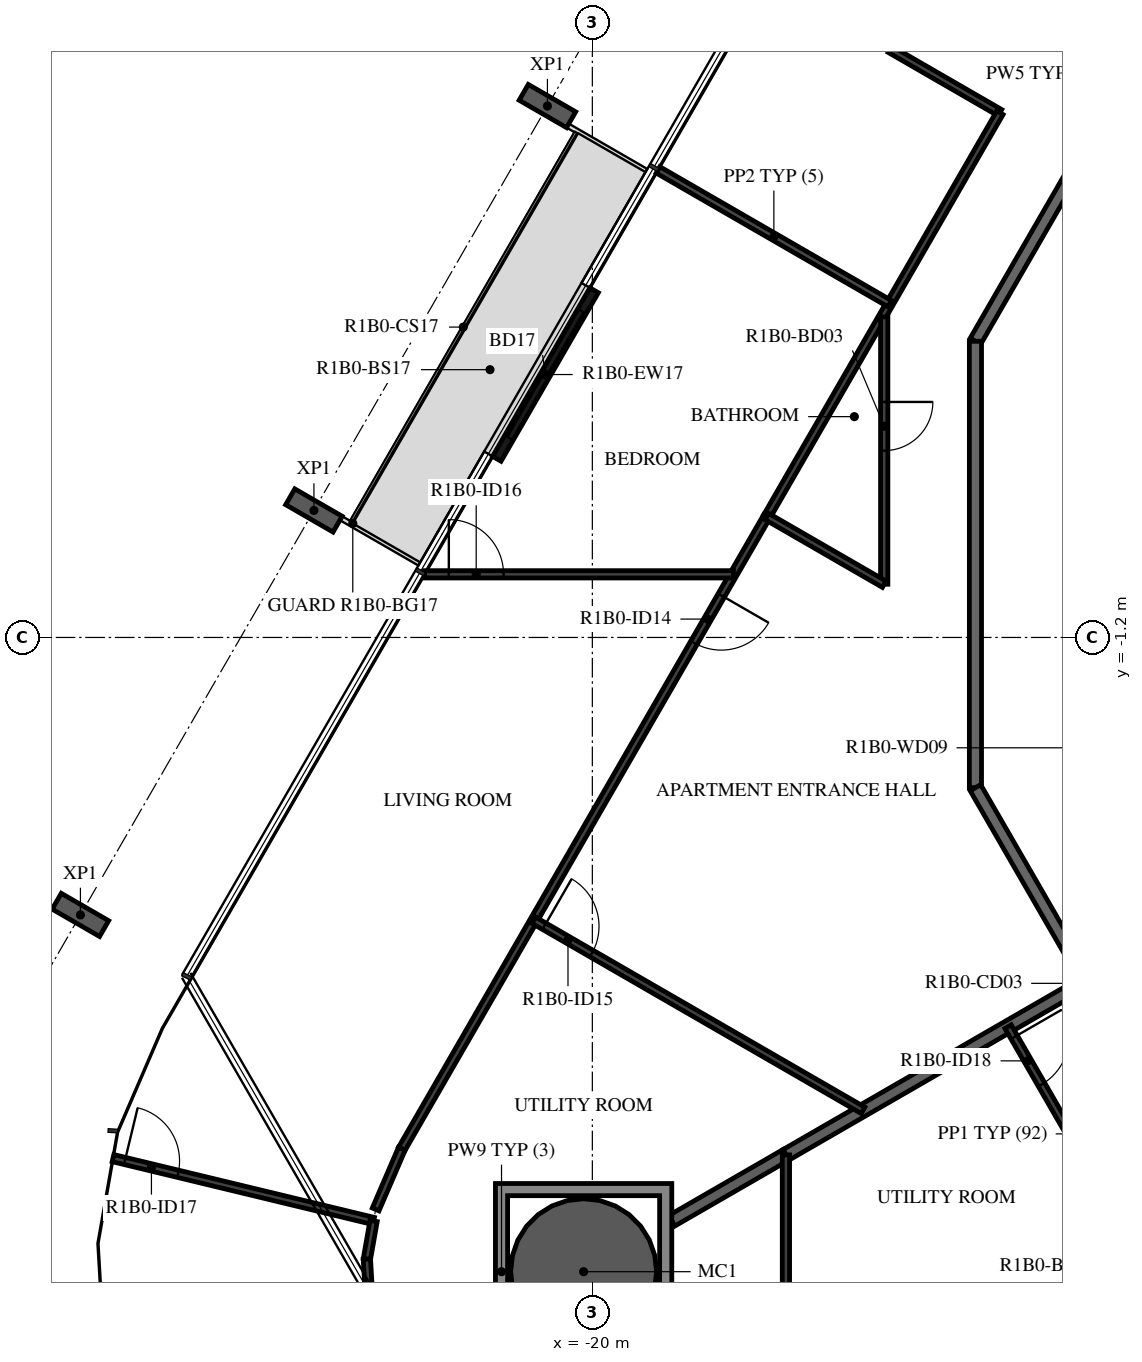
"""IFC4 building model, lengths in metres.
Left out: names, types, materials, properties, quantities, classifications, styles, units other than length and angle.
Written with IfcOpenShell. Run it as: python <this file> out.ifc"""

import sys

from ifc_helpers import new_model, si_unit, direction, frame, frame_2d, origin, origin_2d, place, context, subcontext, project, spatial, polyline, rectangle, hollow_circle, i_section, outline, extrude, element, fill, save


model = new_model("IFC4")
c1 = context("Model", 3, precision=1e-05, world=origin(), true_north=direction((0.0, 1.0)))
c2 = subcontext(c1, "Body", "Model", "MODEL_VIEW")
j1 = project(units=[si_unit("LENGTHUNIT", "METRE"), si_unit("PLANEANGLEUNIT", "RADIAN")], contexts=[c1])
p1 = place(None, origin())
s1 = spatial("IfcSite", under=j1, at=p1, CompositionType="ELEMENT")
p2 = place(p1, origin())
s2 = spatial("IfcBuilding", under=s1, at=p2, CompositionType="ELEMENT")
p3 = place(p2, frame((0.0, 0.0, 52.4)))
s3 = spatial("IfcBuildingStorey", under=s2, at=p3, CompositionType="ELEMENT", Elevation=52.4)
p4 = place(p3, frame((-20.144, -11.63, -0.38), z_axis=(0.0, 0.0, 1.0), x_axis=(1.0, 0.0, 0.0)))
e1 = element("IfcColumn", 1, at=p4, inside=s3, PredefinedType="COLUMN", context=c2, shape_type="SweptSolid", body=[
    extrude(hollow_circle(Radius=1.2, WallThickness=0.06, at=origin_2d()), origin(), (0.0, 0.0, 1.0), 3.5),
])
for number, where, z_axis, x_axis in (
    (2, (-20.739, 7.539, -0.38), (0.0, 0.0, 1.0), (0.5, 0.866, 0.0)),
    (3, (-24.579, 0.888, -0.38), (0.0, 0.0, 1.0), (0.5, 0.866, 0.0)),
    (4, (-28.419, -5.763, -0.38), (0.0, 0.0, 1.0), (0.5, 0.866, 0.0)),
):
    element("IfcColumn", number, at=place(p3, frame(where, z_axis=z_axis, x_axis=x_axis)), inside=s3, PredefinedType="COLUMN", context=c2, shape_type="SweptSolid", body=[
        extrude(i_section(OverallWidth=0.3, OverallDepth=0.9, WebThickness=0.019, FlangeThickness=0.035, FilletRadius=0.03, at=origin_2d()), origin(), (0.0, 0.0, 1.0), 3.5),
    ])
p5 = place(p3, frame((-19.971, 4.51, 0.0), z_axis=(0.0, 0.0, 1.0), x_axis=(-0.500028443584, -0.866008981251, 0.0)))
e5 = element("IfcWall", 5, at=p5, inside=s3, PredefinedType="STANDARD", context=c2, shape_type="SweptSolid", body=[
    extrude(rectangle(XDim=3.2, YDim=0.16, at=frame_2d((1.6, 0.0))), origin(), (0.0, 0.0, 1.0), 3.12),
])
p6 = place(p5, frame((0.4, 0.0, 0.0)))
e6 = element("IfcOpeningElement", 6, at=p6, cuts=e5, PredefinedType="OPENING", context=c2, shape_type="SweptSolid", body=[
    extrude(rectangle(XDim=2.4, YDim=2.4, at=frame_2d((1.2, 1.2))), frame((0.0, 0.09, 0.0), z_axis=(0.0, -1.0, 0.0), x_axis=(1.0, 0.0, 0.0)), (0.0, 0.0, 1.0), 0.18),
])
p7 = place(p3, frame((-10.029, 10.029, 0.0), z_axis=(0.0, 0.0, 1.0), x_axis=(-0.500001669485, -0.866024439905, 0.0)))
e7 = element("IfcWall", 7, at=p7, inside=s3, PredefinedType="STANDARD", context=c2, shape_type="SweptSolid", body=[
    extrude(rectangle(XDim=7.342, YDim=0.2, at=frame_2d((3.671, 0.0))), origin(), (0.0, 0.0, 1.0), 3.12),
])
p8 = place(p7, frame((0.2, 0.0, 0.0)))
e8 = element("IfcOpeningElement", 8, at=p8, cuts=e7, PredefinedType="OPENING", context=c2, shape_type="SweptSolid", body=[
    extrude(rectangle(XDim=1.0, YDim=2.1, at=frame_2d((0.5, 1.05))), frame((0.0, 0.11, 0.0), z_axis=(0.0, -1.0, 0.0), x_axis=(1.0, 0.0, 0.0)), (0.0, 0.0, 1.0), 0.22),
])
for number, where, z_axis, x_axis in (
    (9, (-13.7, 3.671, 0.0), (0.0, 0.0, 1.0), (0.0, -1.0, 0.0)),
    (10, (-13.7, -3.671, 0.0), (0.0, 0.0, 1.0), (0.5, -0.866, 0.0)),
):
    element("IfcWall", number, at=place(p3, frame(where, z_axis=z_axis, x_axis=x_axis)), inside=s3, PredefinedType="STANDARD", context=c2, shape_type="SweptSolid", body=[
        extrude(rectangle(XDim=7.342, YDim=0.2, at=frame_2d((3.671, 0.0))), origin(), (0.0, 0.0, 1.0), 3.12),
    ])
p9 = place(p3, frame((-16.817, -9.709, 0.0), z_axis=(0.0, 0.0, 1.0), x_axis=(0.86604338933, 0.499968846828, 0.0)))
e11 = element("IfcWall", 11, at=p9, inside=s3, PredefinedType="STANDARD", context=c2, shape_type="SweptSolid", body=[
    extrude(rectangle(XDim=5.718, YDim=0.2, at=frame_2d((2.859, 0.0))), origin(), (0.0, 0.0, 1.0), 3.12),
])
p10 = place(p3, frame((-18.694, -10.793, 0.0), z_axis=(0.0, 0.0, 1.0), x_axis=(0.866009251978, 0.500027974705, 0.0)))
e12 = element("IfcWall", 12, at=p10, inside=s3, PredefinedType="STANDARD", context=c2, shape_type="SweptSolid", body=[
    extrude(rectangle(XDim=2.167, YDim=0.2, at=frame_2d((1.084, 0.0))), origin(), (0.0, 0.0, 1.0), 3.12),
])
p11 = place(p3, frame((-15.106, 8.474, 0.0), z_axis=(0.0, 0.0, 1.0), x_axis=(0.866041603473, -0.499971940267, 0.0)))
e13 = element("IfcWall", 13, at=p11, inside=s3, PredefinedType="PARTITIONING", context=c2, shape_type="SweptSolid", body=[
    extrude(rectangle(XDim=2.089, YDim=0.12, at=frame_2d((1.045, 0.0))), origin(), (0.0, 0.0, 1.0), 3.12),
])
p12 = place(p3, frame((-13.297, 7.429, 0.0), z_axis=(0.0, 0.0, 1.0), x_axis=(-0.49999903102, -0.866025963225, 0.0)))
e14 = element("IfcWall", 14, at=p12, inside=s3, PredefinedType="PARTITIONING", context=c2, shape_type="SweptSolid", body=[
    extrude(rectangle(XDim=7.667, YDim=0.12, at=frame_2d((3.833, 0.0))), origin(), (0.0, 0.0, 1.0), 3.12),
])
p13 = place(p3, frame((-17.13, 0.79, 0.0), z_axis=(0.0, 0.0, 1.0), x_axis=(-0.499997052475, -0.866027105532, 0.0)))
e15 = element("IfcWall", 15, at=p13, inside=s3, PredefinedType="PARTITIONING", context=c2, shape_type="SweptSolid", body=[
    extrude(rectangle(XDim=12.006, YDim=0.12, at=frame_2d((6.003, 0.0))), origin(), (0.0, 0.0, 1.0), 3.12),
])
p14 = place(p13, frame((1.498, 0.0, 0.0)))
e16 = element("IfcOpeningElement", 16, at=p14, cuts=e15, PredefinedType="OPENING", context=c2, shape_type="SweptSolid", body=[
    extrude(rectangle(XDim=0.9, YDim=2.1, at=frame_2d((0.45, 1.05))), frame((0.0, 0.07, 0.0), z_axis=(0.0, -1.0, 0.0), x_axis=(1.0, 0.0, 0.0)), (0.0, 0.0, 1.0), 0.14),
])
p15 = place(p3, frame((-15.2, 4.073, 0.0), z_axis=(0.0, 0.0, 1.0), x_axis=(0.0, -1.0, 0.0)))
e17 = element("IfcWall", 17, at=p15, inside=s3, PredefinedType="PARTITIONING", context=c2, shape_type="SweptSolid", body=[
    extrude(rectangle(XDim=4.398, YDim=0.12, at=frame_2d((2.199, 0.0))), origin(), (0.0, 0.0, 1.0), 3.12),
])
p16 = place(p15, frame((1.4, 0.0, 0.0)))
e18 = element("IfcOpeningElement", 18, at=p16, cuts=e17, PredefinedType="OPENING", context=c2, shape_type="SweptSolid", body=[
    extrude(rectangle(XDim=0.8, YDim=2.1, at=frame_2d((0.4, 1.05))), frame((0.0, 0.07, 0.0), z_axis=(0.0, -1.0, 0.0), x_axis=(1.0, 0.0, 0.0)), (0.0, 0.0, 1.0), 0.14),
])
p17 = place(p3, frame((-15.2, -0.325, 0.0), z_axis=(0.0, 0.0, 1.0), x_axis=(-0.866003168561, 0.500038510559, 0.0)))
e19 = element("IfcWall", 19, at=p17, inside=s3, PredefinedType="PARTITIONING", context=c2, shape_type="SweptSolid", body=[
    extrude(rectangle(XDim=2.229, YDim=0.12, at=frame_2d((1.114, 0.0))), origin(), (0.0, 0.0, 1.0), 3.12),
])
p18 = place(p3, frame((-20.963, -5.85, 0.0), z_axis=(0.0, 0.0, 1.0), x_axis=(0.866021746608, -0.500006334362, 0.0)))
e20 = element("IfcWall", 20, at=p18, inside=s3, PredefinedType="PARTITIONING", context=c2, shape_type="SweptSolid", body=[
    extrude(rectangle(XDim=6.253, YDim=0.12, at=frame_2d((3.127, 0.0))), origin(), (0.0, 0.0, 1.0), 3.12),
])
p19 = place(p18, frame((0.2, 0.0, 0.0)))
e21 = element("IfcOpeningElement", 21, at=p19, cuts=e20, PredefinedType="OPENING", context=c2, shape_type="SweptSolid", body=[
    extrude(rectangle(XDim=0.9, YDim=2.1, at=frame_2d((0.45, 1.05))), frame((0.0, 0.07, 0.0), z_axis=(0.0, -1.0, 0.0), x_axis=(1.0, 0.0, 0.0)), (0.0, 0.0, 1.0), 0.14),
])
p20 = place(p3, frame((-18.92, 6.49, 0.0), z_axis=(0.0, 0.0, 1.0), x_axis=(0.865994303029, -0.500053864221, 0.0)))
e22 = element("IfcWall", 22, at=p20, inside=s3, PredefinedType="PARTITIONING", context=c2, shape_type="SweptSolid", body=[
    extrude(rectangle(XDim=4.4, YDim=0.12, at=frame_2d((2.2, 0.0))), origin(), (0.0, 0.0, 1.0), 2.73),
])
p21 = place(p3, frame((-22.76, -0.162, 0.0), z_axis=(0.0, 0.0, 1.0), x_axis=(1.0, 0.0, 0.0)))
e23 = element("IfcWall", 23, at=p21, inside=s3, PredefinedType="PARTITIONING", context=c2, shape_type="SweptSolid", body=[
    extrude(rectangle(XDim=5.081, YDim=0.12, at=frame_2d((2.54, 0.0))), origin(), (0.0, 0.0, 1.0), 3.12),
])
p22 = place(p21, frame((0.4, 0.0, 0.0)))
e24 = element("IfcOpeningElement", 24, at=p22, cuts=e23, PredefinedType="OPENING", context=c2, shape_type="SweptSolid", body=[
    extrude(rectangle(XDim=0.9, YDim=2.1, at=frame_2d((0.45, 1.05))), frame((0.0, 0.07, 0.0), z_axis=(0.0, -1.0, 0.0), x_axis=(1.0, 0.0, 0.0)), (0.0, 0.0, 1.0), 0.14),
])
p23 = place(p3, frame((-23.564, -10.606, 0.0), z_axis=(0.0, 0.0, 1.0), x_axis=(0.396195073027, 0.918166359713, 0.0)))
e25 = element("IfcWall", 25, at=p23, inside=s3, PredefinedType="PARTITIONING", context=c2, shape_type="SweptSolid", body=[
    extrude(rectangle(XDim=1.087, YDim=0.12, at=frame_2d((0.543, 0.0))), origin(), (0.0, 0.0, 1.0), 3.12),
])
p24 = place(p3, frame((-27.883, -9.762, 0.0), z_axis=(0.0, 0.0, 1.0), x_axis=(0.972097015458, -0.234579181809, 0.0)))
e26 = element("IfcWall", 26, at=p24, inside=s3, PredefinedType="PARTITIONING", context=c2, shape_type="SweptSolid", body=[
    extrude(rectangle(XDim=4.409, YDim=0.12, at=frame_2d((2.204, 0.0))), origin(), (0.0, 0.0, 1.0), 3.12),
])
p25 = place(p24, frame((0.2, 0.0, 0.0)))
e27 = element("IfcOpeningElement", 27, at=p25, cuts=e26, PredefinedType="OPENING", context=c2, shape_type="SweptSolid", body=[
    extrude(rectangle(XDim=0.9, YDim=2.1, at=frame_2d((0.45, 1.05))), frame((0.0, 0.07, 0.0), z_axis=(0.0, -1.0, 0.0), x_axis=(1.0, 0.0, 0.0)), (0.0, 0.0, 1.0), 0.14),
])
p26 = place(p3, frame((-23.597, -10.796, 0.0), z_axis=(0.0, 0.0, 1.0), x_axis=(-0.173610040386, -0.984814476882, 0.0)))
e28 = element("IfcWall", 28, at=p26, inside=s3, PredefinedType="PARTITIONING", context=c2, shape_type="SweptSolid", body=[
    extrude(rectangle(XDim=0.636, YDim=0.12, at=frame_2d((0.318, 0.0))), origin(), (0.0, 0.0, 1.0), 3.12),
])
p27 = place(p3, frame((-23.708, -11.422, 0.0), z_axis=(0.0, 0.0, 1.0), x_axis=(0.058031280246, -0.998314765248, 0.0)))
e29 = element("IfcWall", 29, at=p27, inside=s3, PredefinedType="PARTITIONING", context=c2, shape_type="SweptSolid", body=[
    extrude(rectangle(XDim=0.829, YDim=0.12, at=frame_2d((0.415, 0.0))), origin(), (0.0, 0.0, 1.0), 3.12),
])
p28 = place(p3, frame((-13.164, -7.6, 0.0), z_axis=(0.0, 0.0, 1.0), x_axis=(0.500000928893, -0.866024867487, 0.0)))
e30 = element("IfcWall", 30, at=p28, inside=s3, PredefinedType="PARTITIONING", context=c2, shape_type="SweptSolid", body=[
    extrude(rectangle(XDim=4.073, YDim=0.12, at=frame_2d((2.036, 0.0))), origin(), (0.0, 0.0, 1.0), 3.12),
])
p29 = place(p28, frame((0.2, 0.0, 0.0)))
e31 = element("IfcOpeningElement", 31, at=p29, cuts=e30, PredefinedType="OPENING", context=c2, shape_type="SweptSolid", body=[
    extrude(rectangle(XDim=0.9, YDim=2.1, at=frame_2d((0.45, 1.05))), frame((0.0, 0.07, 0.0), z_axis=(0.0, -1.0, 0.0), x_axis=(1.0, 0.0, 0.0)), (0.0, 0.0, 1.0), 0.14),
])
p30 = place(p3, frame((-16.817, -14.43, 0.0), z_axis=(0.0, 0.0, 1.0), x_axis=(0.0, 1.0, 0.0)))
e32 = element("IfcWall", 32, at=p30, inside=s3, PredefinedType="PARTITIONING", context=c2, shape_type="SweptSolid", body=[
    extrude(rectangle(XDim=4.721, YDim=0.12, at=frame_2d((2.36, 0.0))), origin(), (0.0, 0.0, 1.0), 3.12),
])
p31 = place(p30, frame((0.2, 0.0, 0.0)))
e33 = element("IfcOpeningElement", 33, at=p31, cuts=e32, PredefinedType="OPENING", context=c2, shape_type="SweptSolid", body=[
    extrude(rectangle(XDim=0.9, YDim=2.1, at=frame_2d((0.45, 1.05))), frame((0.0, 0.07, 0.0), z_axis=(0.0, -1.0, 0.0), x_axis=(1.0, 0.0, 0.0)), (0.0, 0.0, 1.0), 0.14),
])
p32 = place(p3, origin())
e34 = element("IfcWall", 34, at=p32, inside=s3, PredefinedType="STANDARD", context=c2, shape_type="SweptSolid", body=[
    extrude(outline(polyline([(-18.694, -10.18), (-18.694, -13.08), (-21.594, -13.08), (-21.594, -10.18), (-18.694, -10.18)]), holes=[polyline([(-21.394, -12.88), (-18.894, -12.88), (-18.894, -10.38), (-21.394, -10.38), (-21.394, -12.88)])]), origin(), (0.0, 0.0, 1.0), 3.12),
])
p33 = place(p6, origin())
e35 = element("IfcDoor", 35, at=p33, inside=s3, OperationType="DOUBLE_DOOR_SLIDING", PredefinedType="DOOR", context=c2, shape_type="SweptSolid", body=[
    extrude(rectangle(XDim=2.4, YDim=2.4, at=frame_2d((1.2, 1.2))), frame((0.0, 0.025, 0.0), z_axis=(0.0, -1.0, 0.0), x_axis=(1.0, 0.0, 0.0)), (0.0, 0.0, 1.0), 0.05),
])
fill(e6, e35)
p34 = place(p16, origin())
e36 = element("IfcDoor", 36, at=p34, inside=s3, OperationType="SINGLE_SWING_RIGHT", PredefinedType="DOOR", context=c2, shape_type="SweptSolid", body=[
    extrude(rectangle(XDim=0.8, YDim=2.1, at=frame_2d((0.4, 1.05))), frame((0.0, 0.025, 0.0), z_axis=(0.0, -1.0, 0.0), x_axis=(1.0, 0.0, 0.0)), (0.0, 0.0, 1.0), 0.05),
])
fill(e18, e36)
p35 = place(p14, origin())
e37 = element("IfcDoor", 37, at=p35, inside=s3, OperationType="SINGLE_SWING_RIGHT", PredefinedType="DOOR", context=c2, shape_type="SweptSolid", body=[
    extrude(rectangle(XDim=0.9, YDim=2.1, at=frame_2d((0.45, 1.05))), frame((0.0, 0.025, 0.0), z_axis=(0.0, -1.0, 0.0), x_axis=(1.0, 0.0, 0.0)), (0.0, 0.0, 1.0), 0.05),
])
fill(e16, e37)
p36 = place(p19, origin())
e38 = element("IfcDoor", 38, at=p36, inside=s3, OperationType="SINGLE_SWING_RIGHT", PredefinedType="DOOR", context=c2, shape_type="SweptSolid", body=[
    extrude(rectangle(XDim=0.9, YDim=2.1, at=frame_2d((0.45, 1.05))), frame((0.0, 0.025, 0.0), z_axis=(0.0, -1.0, 0.0), x_axis=(1.0, 0.0, 0.0)), (0.0, 0.0, 1.0), 0.05),
])
fill(e21, e38)
p37 = place(p22, origin())
e39 = element("IfcDoor", 39, at=p37, inside=s3, OperationType="SINGLE_SWING_LEFT", PredefinedType="DOOR", context=c2, shape_type="SweptSolid", body=[
    extrude(rectangle(XDim=0.9, YDim=2.1, at=frame_2d((0.45, 1.05))), frame((0.0, 0.025, 0.0), z_axis=(0.0, -1.0, 0.0), x_axis=(1.0, 0.0, 0.0)), (0.0, 0.0, 1.0), 0.05),
])
fill(e24, e39)
p38 = place(p25, origin())
e40 = element("IfcDoor", 40, at=p38, inside=s3, OperationType="SINGLE_SWING_RIGHT", PredefinedType="DOOR", context=c2, shape_type="SweptSolid", body=[
    extrude(rectangle(XDim=0.9, YDim=2.1, at=frame_2d((0.45, 1.05))), frame((0.0, 0.025, 0.0), z_axis=(0.0, -1.0, 0.0), x_axis=(1.0, 0.0, 0.0)), (0.0, 0.0, 1.0), 0.05),
])
fill(e27, e40)
p39 = place(p29, origin())
e41 = element("IfcDoor", 41, at=p39, inside=s3, OperationType="SINGLE_SWING_LEFT", PredefinedType="DOOR", context=c2, shape_type="SweptSolid", body=[
    extrude(rectangle(XDim=0.9, YDim=2.1, at=frame_2d((0.45, 1.05))), frame((0.0, 0.025, 0.0), z_axis=(0.0, -1.0, 0.0), x_axis=(1.0, 0.0, 0.0)), (0.0, 0.0, 1.0), 0.05),
])
fill(e31, e41)
save(model, sys.argv[1])
